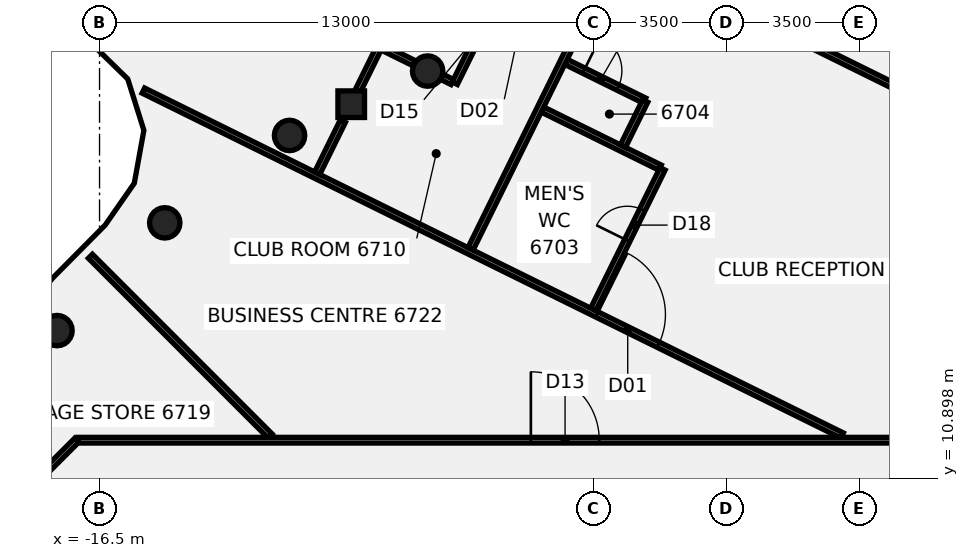
"""IFC4 building model, lengths in metres.
Left out: names, types, materials, properties, quantities, classifications, styles, units other than length and angle.
Written with IfcOpenShell. Run it as: python <this file> out.ifc"""

import sys

from ifc_helpers import new_model, si_unit, direction, frame, frame_2d, origin, origin_2d, place, context, subcontext, project, spatial, rectangle, circle, extrude, element, fill, save


model = new_model("IFC4")
c1 = context("Model", 3, precision=1e-05, world=origin(), true_north=direction((0.0, 1.0)))
c2 = subcontext(c1, "Body", "Model", "MODEL_VIEW")
j1 = project(units=[si_unit("LENGTHUNIT", "METRE"), si_unit("PLANEANGLEUNIT", "RADIAN")], contexts=[c1])
p1 = place(None, origin())
s1 = spatial("IfcSite", under=j1, at=p1, CompositionType="ELEMENT")
p2 = place(p1, origin())
s2 = spatial("IfcBuilding", under=s1, at=p2, CompositionType="ELEMENT")
p3 = place(p2, frame((0.0, 0.0, 264.0)))
s3 = spatial("IfcBuildingStorey", under=s2, at=p3, CompositionType="ELEMENT", Elevation=264.0)
for number, where, z_axis, x_axis in (
    (1, (-7.866, 21.613, -0.14), (0.0, 0.0, 1.0), (1.0, 0.0, 0.0)),
    (2, (-11.5, 19.919, -0.14), (0.0, 0.0, 1.0), (1.0, 0.0, 0.0)),
    (3, (-14.784, 17.619, -0.14), (0.0, 0.0, 1.0), (1.0, 0.0, 0.0)),
    (4, (-17.619, 14.784, -0.14), (0.0, 0.0, 1.0), (1.0, 0.0, 0.0)),
):
    element("IfcColumn", number, at=place(p3, frame(where, z_axis=z_axis, x_axis=x_axis)), inside=s3, PredefinedType="COLUMN", context=c2, shape_type="SweptSolid", body=[
        extrude(circle(Radius=0.4, at=origin_2d()), origin(), (0.0, 0.0, 1.0), 3.6),
    ])
p4 = place(p3, frame((-9.877, 20.741, -0.139), z_axis=(0.006777933843, -0.049953372425, 0.998728551808), x_axis=(0.44361754105, 0.895242437735, 0.041766672718)))
e5 = element("IfcColumn", 5, at=p4, inside=s3, PredefinedType="COLUMN", context=c2, shape_type="SweptSolid", body=[
    extrude(rectangle(XDim=0.7, YDim=0.7, at=origin_2d()), origin(), (0.0, 0.0, 1.0), 3.602),
])
p5 = place(p3, frame((-16.74, 16.74, 0.0), z_axis=(0.0, 0.0, 1.0), x_axis=(0.707106781187, -0.707106781187, 0.0)))
e6 = element("IfcWall", 6, at=p5, inside=s3, PredefinedType="PARTITIONING", context=c2, shape_type="SweptSolid", body=[
    extrude(rectangle(XDim=6.691, YDim=0.15, at=frame_2d((3.345, 0.0))), origin(), (0.0, 0.0, 1.0), 2.864),
])
p6 = place(p3, frame((-15.346, 21.099, 0.0), z_axis=(0.0, 0.0, 1.0), x_axis=(0.896736901725, -0.442564039529, 0.0)))
e7 = element("IfcWall", 7, at=p6, inside=s3, PredefinedType="PARTITIONING", context=c2, shape_type="SweptSolid", body=[
    extrude(rectangle(XDim=20.505, YDim=0.15, at=frame_2d((10.252, 0.0))), origin(), (0.0, 0.0, 1.0), 2.864),
])
p7 = place(p6, frame((13.313, 0.0, 0.0)))
e8 = element("IfcOpeningElement", 8, at=p7, cuts=e7, PredefinedType="OPENING", context=c2, shape_type="SweptSolid", body=[
    extrude(rectangle(XDim=1.8, YDim=2.1, at=frame_2d((0.9, 1.05))), frame((0.0, 0.085, 0.0), z_axis=(0.0, -1.0, 0.0), x_axis=(1.0, 0.0, 0.0)), (0.0, 0.0, 1.0), 0.17),
])
p8 = place(p3, frame((-9.058, 22.233, 0.0), z_axis=(0.0, 0.0, 1.0), x_axis=(0.896612194763, -0.442816634965, 0.0)))
e9 = element("IfcWall", 9, at=p8, inside=s3, PredefinedType="PARTITIONING", context=c2, shape_type="SweptSolid", body=[
    extrude(rectangle(XDim=0.934, YDim=0.15, at=frame_2d((0.467, 0.0))), origin(), (0.0, 0.0, 1.0), 2.864),
])
p9 = place(p3, frame((-7.497, 21.462, 0.0), z_axis=(0.0, 0.0, 1.0), x_axis=(0.896780848016, -0.442474983058, 0.0)))
e10 = element("IfcWall", 10, at=p9, inside=s3, PredefinedType="PARTITIONING", context=c2, shape_type="SweptSolid", body=[
    extrude(rectangle(XDim=0.31, YDim=0.15, at=frame_2d((0.155, 0.0))), origin(), (0.0, 0.0, 1.0), 2.864),
])
p10 = place(p3, frame((-4.845, 20.6, 0.0), z_axis=(0.0, 0.0, 1.0), x_axis=(0.896750466417, -0.442536553272, 0.0)))
e11 = element("IfcWall", 11, at=p10, inside=s3, PredefinedType="PARTITIONING", context=c2, shape_type="SweptSolid", body=[
    extrude(rectangle(XDim=3.45, YDim=0.15, at=frame_2d((1.725, 0.0))), origin(), (0.0, 0.0, 1.0), 2.864),
])
p11 = place(p3, frame((-4.221, 21.853, 0.0), z_axis=(0.0, 0.0, 1.0), x_axis=(0.896771622249, -0.442493680778, 0.0)))
e12 = element("IfcWall", 12, at=p11, inside=s3, PredefinedType="PARTITIONING", context=c2, shape_type="SweptSolid", body=[
    extrude(rectangle(XDim=2.3, YDim=0.15, at=frame_2d((1.15, 0.0))), origin(), (0.0, 0.0, 1.0), 2.864),
])
p12 = place(p11, frame((0.52, 0.0, 0.0)))
e13 = element("IfcOpeningElement", 13, at=p12, cuts=e12, PredefinedType="OPENING", context=c2, shape_type="SweptSolid", body=[
    extrude(rectangle(XDim=1.0, YDim=2.1, at=frame_2d((0.5, 1.05))), frame((0.0, 0.085, 0.0), z_axis=(0.0, -1.0, 0.0), x_axis=(1.0, 0.0, 0.0)), (0.0, 0.0, 1.0), 0.17),
])
p13 = place(p3, frame((0.327, 23.233, 0.0), z_axis=(0.0, 0.0, 1.0), x_axis=(0.896732994019, -0.442571957355, 0.0)))
e14 = element("IfcWall", 14, at=p13, inside=s3, PredefinedType="PARTITIONING", context=c2, shape_type="SweptSolid", body=[
    extrude(rectangle(XDim=14.178, YDim=0.15, at=frame_2d((7.089, 0.0))), origin(), (0.0, 0.0, 1.0), 2.864),
])
p14 = place(p13, frame((4.65, 0.0, 0.0)))
e15 = element("IfcOpeningElement", 15, at=p14, cuts=e14, PredefinedType="OPENING", context=c2, shape_type="SweptSolid", body=[
    extrude(rectangle(XDim=0.9, YDim=2.1, at=frame_2d((0.45, 1.05))), frame((0.0, 0.085, 0.0), z_axis=(0.0, -1.0, 0.0), x_axis=(1.0, 0.0, 0.0)), (0.0, 0.0, 1.0), 0.17),
])
p15 = place(p3, frame((-17.065, 11.9, 0.0), z_axis=(0.0, 0.0, 1.0), x_axis=(1.0, 0.0, 0.0)))
e16 = element("IfcWall", 16, at=p15, inside=s3, PredefinedType="PARTITIONING", context=c2, shape_type="SweptSolid", body=[
    extrude(rectangle(XDim=34.165, YDim=0.15, at=frame_2d((17.083, 0.0))), origin(), (0.0, 0.0, 1.0), 2.864),
])
p16 = place(p15, frame((23.057, 0.0, 0.0)))
e17 = element("IfcOpeningElement", 17, at=p16, cuts=e16, PredefinedType="OPENING", context=c2, shape_type="SweptSolid", body=[
    extrude(rectangle(XDim=1.8, YDim=2.1, at=frame_2d((0.9, 1.05))), frame((0.0, 0.085, 0.0), z_axis=(0.0, -1.0, 0.0), x_axis=(1.0, 0.0, 0.0)), (0.0, 0.0, 1.0), 0.17),
])
p17 = place(p15, frame((30.465, 0.0, 0.0)))
e18 = element("IfcOpeningElement", 18, at=p17, cuts=e16, PredefinedType="OPENING", context=c2, shape_type="SweptSolid", body=[
    extrude(rectangle(XDim=0.9, YDim=2.1, at=frame_2d((0.45, 1.05))), frame((0.0, 0.085, 0.0), z_axis=(0.0, -1.0, 0.0), x_axis=(1.0, 0.0, 0.0)), (0.0, 0.0, 1.0), 0.17),
])
p18 = place(p15, frame((11.915, 0.0, 0.0)))
e19 = element("IfcOpeningElement", 19, at=p18, cuts=e16, PredefinedType="OPENING", context=c2, shape_type="SweptSolid", body=[
    extrude(rectangle(XDim=1.8, YDim=2.1, at=frame_2d((0.9, 1.05))), frame((0.0, 0.085, 0.0), z_axis=(0.0, -1.0, 0.0), x_axis=(1.0, 0.0, 0.0)), (0.0, 0.0, 1.0), 0.17),
])
p19 = place(p3, frame((-18.872, 10.128, 0.0), z_axis=(0.0, 0.0, 1.0), x_axis=(0.707106781187, 0.707106781187, 0.0)))
e20 = element("IfcWall", 20, at=p19, inside=s3, PredefinedType="PARTITIONING", context=c2, shape_type="SweptSolid", body=[
    extrude(rectangle(XDim=2.505, YDim=0.15, at=frame_2d((1.253, 0.0))), origin(), (0.0, 0.0, 1.0), 2.864),
])
p20 = place(p3, frame((-10.773, 18.925, 0.0), z_axis=(0.0, 0.0, 1.0), x_axis=(0.44235057228, 0.896842222023, 0.0)))
e21 = element("IfcWall", 21, at=p20, inside=s3, PredefinedType="PARTITIONING", context=c2, shape_type="SweptSolid", body=[
    extrude(rectangle(XDim=1.528, YDim=0.15, at=frame_2d((0.764, 0.0))), origin(), (0.0, 0.0, 1.0), 2.864),
])
p21 = place(p3, frame((-9.728, 21.044, 0.0), z_axis=(0.0, 0.0, 1.0), x_axis=(0.442372056377, 0.896831625076, 0.0)))
e22 = element("IfcWall", 22, at=p21, inside=s3, PredefinedType="PARTITIONING", context=c2, shape_type="SweptSolid", body=[
    extrude(rectangle(XDim=6.322, YDim=0.15, at=frame_2d((3.161, 0.0))), origin(), (0.0, 0.0, 1.0), 2.864),
])
p22 = place(p21, frame((4.112, 0.0, 0.0)))
e23 = element("IfcOpeningElement", 23, at=p22, cuts=e22, PredefinedType="OPENING", context=c2, shape_type="SweptSolid", body=[
    extrude(rectangle(XDim=1.8, YDim=2.1, at=frame_2d((0.9, 1.05))), frame((0.0, 0.085, 0.0), z_axis=(0.0, -1.0, 0.0), x_axis=(1.0, 0.0, 0.0)), (0.0, 0.0, 1.0), 0.17),
])
p23 = place(p3, frame((-7.152, 21.292, 0.0), z_axis=(0.0, 0.0, 1.0), x_axis=(0.442645023645, 0.896696929315, 0.0)))
e24 = element("IfcWall", 24, at=p23, inside=s3, PredefinedType="PARTITIONING", context=c2, shape_type="SweptSolid", body=[
    extrude(rectangle(XDim=2.526, YDim=0.15, at=frame_2d((1.263, 0.0))), origin(), (0.0, 0.0, 1.0), 2.864),
])
p24 = place(p23, frame((1.05, 0.0, 0.0)))
e25 = element("IfcOpeningElement", 25, at=p24, cuts=e24, PredefinedType="OPENING", context=c2, shape_type="SweptSolid", body=[
    extrude(rectangle(XDim=0.9, YDim=2.1, at=frame_2d((0.45, 1.05))), frame((0.0, 0.085, 0.0), z_axis=(0.0, -1.0, 0.0), x_axis=(1.0, 0.0, 0.0)), (0.0, 0.0, 1.0), 0.17),
])
p25 = place(p3, frame((-6.736, 16.938, 0.0), z_axis=(0.0, 0.0, 1.0), x_axis=(0.442543279476, 0.896747147077, 0.0)))
e26 = element("IfcWall", 26, at=p25, inside=s3, PredefinedType="PARTITIONING", context=c2, shape_type="SweptSolid", body=[
    extrude(rectangle(XDim=6.114, YDim=0.15, at=frame_2d((3.057, 0.0))), origin(), (0.0, 0.0, 1.0), 2.864),
])
p26 = place(p3, frame((-3.508, 15.345, 0.0), z_axis=(0.0, 0.0, 1.0), x_axis=(0.442515086805, 0.896761059564, 0.0)))
e27 = element("IfcWall", 27, at=p26, inside=s3, PredefinedType="PARTITIONING", context=c2, shape_type="SweptSolid", body=[
    extrude(rectangle(XDim=4.121, YDim=0.15, at=frame_2d((2.061, 0.0))), origin(), (0.0, 0.0, 1.0), 2.864),
])
p27 = place(p26, frame((2.02, 0.0, 0.0)))
e28 = element("IfcOpeningElement", 28, at=p27, cuts=e27, PredefinedType="OPENING", context=c2, shape_type="SweptSolid", body=[
    extrude(rectangle(XDim=0.9, YDim=2.1, at=frame_2d((0.45, 1.05))), frame((0.0, 0.085, 0.0), z_axis=(0.0, -1.0, 0.0), x_axis=(1.0, 0.0, 0.0)), (0.0, 0.0, 1.0), 0.17),
])
p28 = place(p3, frame((-2.727, 19.638, 0.0), z_axis=(0.0, 0.0, 1.0), x_axis=(0.442266076038, 0.896883893258, 0.0)))
e29 = element("IfcWall", 29, at=p28, inside=s3, PredefinedType="PARTITIONING", context=c2, shape_type="SweptSolid", body=[
    extrude(rectangle(XDim=1.324, YDim=0.15, at=frame_2d((0.662, 0.0))), origin(), (0.0, 0.0, 1.0), 2.864),
])
p29 = place(p7, origin())
e30 = element("IfcDoor", 30, at=p29, inside=s3, OperationType="DOUBLE_DOOR_SINGLE_SWING", PredefinedType="DOOR", context=c2, shape_type="SweptSolid", body=[
    extrude(rectangle(XDim=1.8, YDim=2.1, at=frame_2d((0.9, 1.05))), frame((0.0, 0.025, 0.0), z_axis=(0.0, -1.0, 0.0), x_axis=(1.0, 0.0, 0.0)), (0.0, 0.0, 1.0), 0.05),
])
fill(e8, e30)
p30 = place(p12, frame((1.0, 0.0, 0.0), z_axis=(0.0, 0.0, 1.0), x_axis=(-1.0, 0.0, 0.0)))
e31 = element("IfcDoor", 31, at=p30, inside=s3, OperationType="SINGLE_SWING_LEFT", PredefinedType="DOOR", context=c2, shape_type="SweptSolid", body=[
    extrude(rectangle(XDim=1.0, YDim=2.1, at=frame_2d((0.5, 1.05))), frame((0.0, 0.025, 0.0), z_axis=(0.0, -1.0, 0.0), x_axis=(1.0, 0.0, 0.0)), (0.0, 0.0, 1.0), 0.05),
])
fill(e13, e31)
p31 = place(p18, frame((1.8, 0.0, 0.0), z_axis=(0.0, 0.0, 1.0), x_axis=(-1.0, 0.0, 0.0)))
e32 = element("IfcDoor", 32, at=p31, inside=s3, OperationType="DOUBLE_DOOR_SINGLE_SWING", PredefinedType="DOOR", context=c2, shape_type="SweptSolid", body=[
    extrude(rectangle(XDim=1.8, YDim=2.1, at=frame_2d((0.9, 1.05))), frame((0.0, 0.025, 0.0), z_axis=(0.0, -1.0, 0.0), x_axis=(1.0, 0.0, 0.0)), (0.0, 0.0, 1.0), 0.05),
])
fill(e19, e32)
p32 = place(p27, origin())
e33 = element("IfcDoor", 33, at=p32, inside=s3, OperationType="SINGLE_SWING_LEFT", PredefinedType="DOOR", context=c2, shape_type="SweptSolid", body=[
    extrude(rectangle(XDim=0.9, YDim=2.1, at=frame_2d((0.45, 1.05))), frame((0.0, 0.025, 0.0), z_axis=(0.0, -1.0, 0.0), x_axis=(1.0, 0.0, 0.0)), (0.0, 0.0, 1.0), 0.05),
])
fill(e28, e33)
save(model, sys.argv[1])
